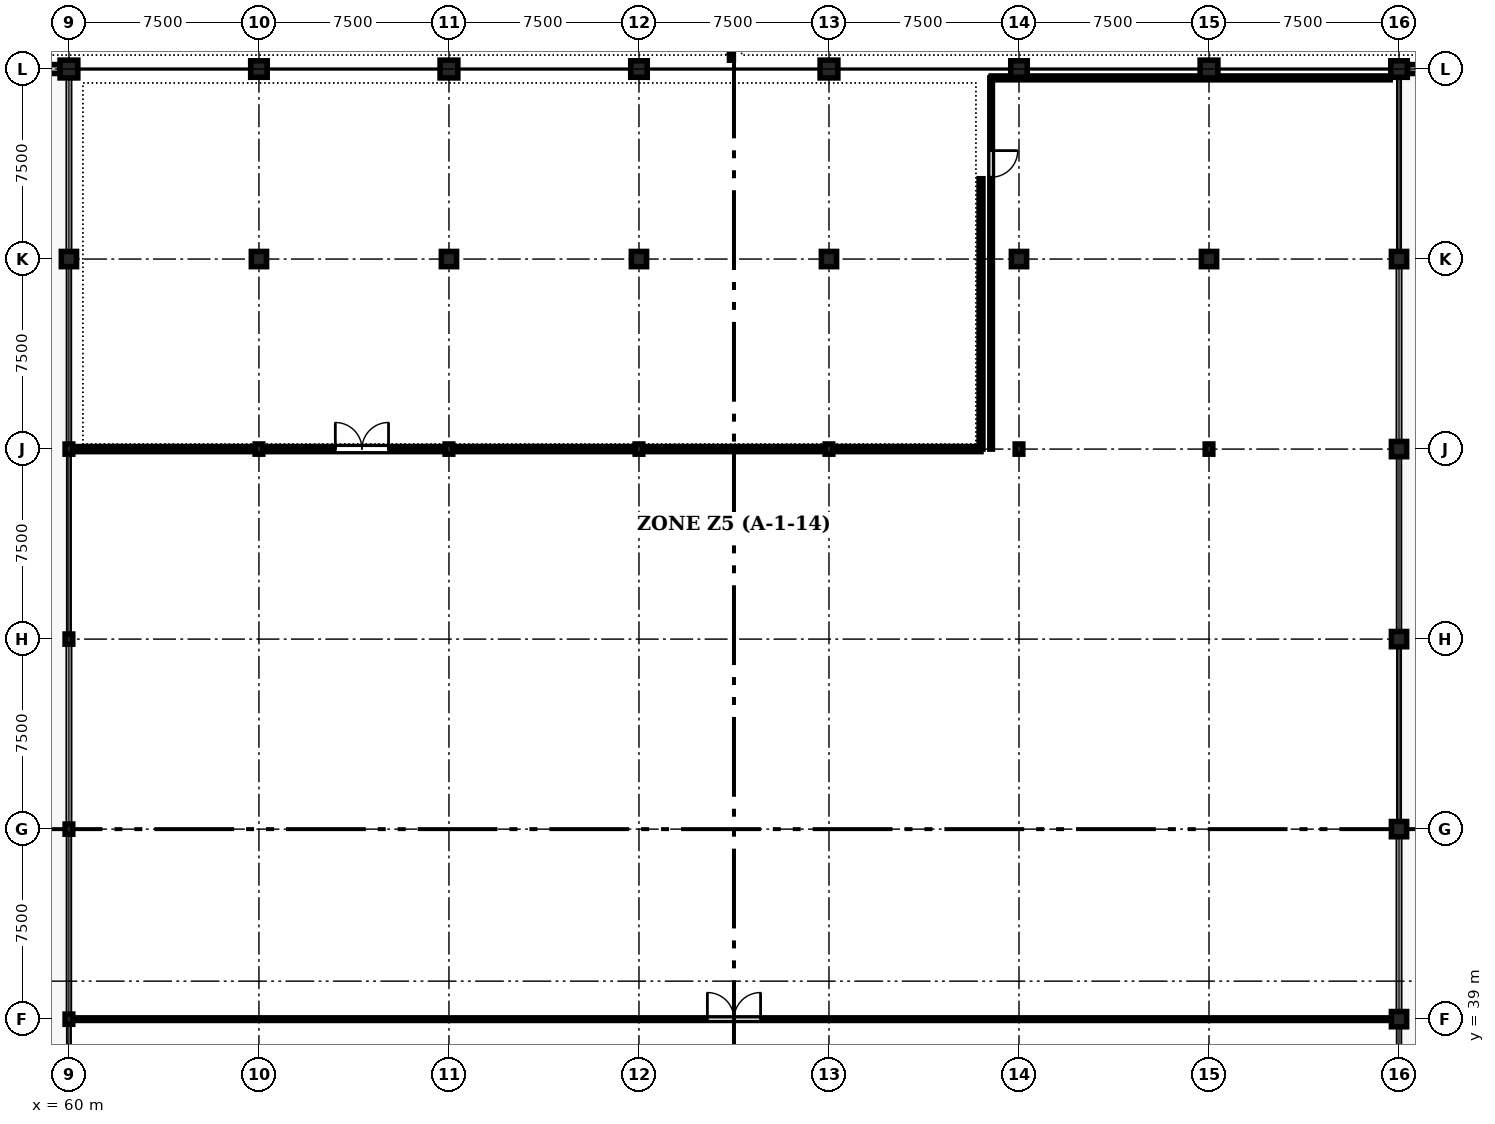
"""IFC4 building model, lengths in metres.
Left out: names, types, materials, properties, quantities, classifications, styles, units other than length and angle.
Written with IfcOpenShell. Run it as: python <this file> out.ifc"""

import sys

from ifc_helpers import new_model, si_unit, direction, frame, frame_2d, origin, origin_2d, place, context, subcontext, project, spatial, rectangle, circle, i_section, extrude, element, fill, save


model = new_model("IFC4")
c1 = context("Model", 3, precision=1e-05, world=origin(), true_north=direction((0.0, 1.0)))
c2 = subcontext(c1, "Body", "Model", "MODEL_VIEW")
j1 = project(units=[si_unit("LENGTHUNIT", "METRE"), si_unit("PLANEANGLEUNIT", "RADIAN")], contexts=[c1])
p1 = place(None, origin())
s1 = spatial("IfcSite", under=j1, at=p1, CompositionType="ELEMENT")
p2 = place(p1, origin())
s2 = spatial("IfcBuilding", under=s1, at=p2, CompositionType="ELEMENT")
p3 = place(p2, origin())
s3 = spatial("IfcBuildingStorey", under=s2, at=p3, CompositionType="ELEMENT", Elevation=0.0)
for number, where, z_axis, x_axis in (
    (1, (60.0, 39.0, 0.0), (0.0, 0.0, 1.0), (1.0, 0.0, 0.0)),
    (2, (60.0, 46.5, 0.0), (0.0, 0.0, 1.0), (1.0, 0.0, 0.0)),
    (3, (60.0, 54.0, 0.0), (0.0, 0.0, 1.0), (1.0, 0.0, 0.0)),
    (4, (60.0, 61.5, 0.0), (0.0, 0.0, 1.0), (1.0, 0.0, 0.0)),
):
    element("IfcColumn", number, at=place(p3, frame(where, z_axis=z_axis, x_axis=x_axis)), inside=s3, PredefinedType="COLUMN", context=c2, shape_type="SweptSolid", body=[
        extrude(i_section(OverallWidth=0.3, OverallDepth=0.4, WebThickness=0.013, FlangeThickness=0.024, FilletRadius=0.027, at=origin_2d()), origin(), (0.0, 0.0, 1.0), 4.8),
    ])
p4 = place(p3, frame((60.0, 69.0, 0.0), z_axis=(0.0, 0.0, 1.0), x_axis=(1.0, 0.0, 0.0)))
e5 = element("IfcColumn", 5, at=p4, inside=s3, PredefinedType="COLUMN", context=c2, shape_type="SweptSolid", body=[
    extrude(rectangle(XDim=0.6, YDim=0.6, at=origin_2d()), origin(), (0.0, 0.0, 1.0), 4.8),
])
p5 = place(p3, frame((60.0, 76.5, 0.0), z_axis=(0.0, 0.0, 1.0), x_axis=(1.0, 0.0, 0.0)))
e6 = element("IfcColumn", 6, at=p5, inside=s3, PredefinedType="COLUMN", context=c2, shape_type="SweptSolid", body=[
    extrude(rectangle(XDim=0.7, YDim=0.7, at=origin_2d()), origin(), (0.0, 0.0, 1.0), 4.8),
])
p6 = place(p3, frame((67.5, 61.5, 0.0), z_axis=(0.0, 0.0, 1.0), x_axis=(1.0, 0.0, 0.0)))
e7 = element("IfcColumn", 7, at=p6, inside=s3, PredefinedType="COLUMN", context=c2, shape_type="SweptSolid", body=[
    extrude(i_section(OverallWidth=0.3, OverallDepth=0.4, WebThickness=0.013, FlangeThickness=0.024, FilletRadius=0.027, at=origin_2d()), origin(), (0.0, 0.0, 1.0), 4.8),
])
p7 = place(p3, frame((67.5, 69.0, 0.0), z_axis=(0.0, 0.0, 1.0), x_axis=(1.0, 0.0, 0.0)))
e8 = element("IfcColumn", 8, at=p7, inside=s3, PredefinedType="COLUMN", context=c2, shape_type="SweptSolid", body=[
    extrude(circle(Radius=0.3, at=origin_2d()), origin(), (0.0, 0.0, 1.0), 4.8),
])
p8 = place(p3, frame((67.5, 76.5, 0.0), z_axis=(0.0, 0.0, 1.0), x_axis=(1.0, 0.0, 0.0)))
e9 = element("IfcColumn", 9, at=p8, inside=s3, PredefinedType="COLUMN", context=c2, shape_type="SweptSolid", body=[
    extrude(rectangle(XDim=0.65, YDim=0.65, at=origin_2d()), origin(), (0.0, 0.0, 1.0), 4.8),
])
p9 = place(p3, frame((75.0, 61.5, 0.0), z_axis=(0.0, 0.0, 1.0), x_axis=(1.0, 0.0, 0.0)))
e10 = element("IfcColumn", 10, at=p9, inside=s3, PredefinedType="COLUMN", context=c2, shape_type="SweptSolid", body=[
    extrude(i_section(OverallWidth=0.3, OverallDepth=0.4, WebThickness=0.013, FlangeThickness=0.024, FilletRadius=0.027, at=origin_2d()), origin(), (0.0, 0.0, 1.0), 4.8),
])
p10 = place(p3, frame((75.0, 69.0, 0.0), z_axis=(0.0, 0.0, 1.0), x_axis=(1.0, 0.0, 0.0)))
e11 = element("IfcColumn", 11, at=p10, inside=s3, PredefinedType="COLUMN", context=c2, shape_type="SweptSolid", body=[
    extrude(rectangle(XDim=0.6, YDim=0.6, at=origin_2d()), origin(), (0.0, 0.0, 1.0), 4.8),
])
p11 = place(p3, frame((75.0, 76.5, 0.0), z_axis=(0.0, 0.0, 1.0), x_axis=(1.0, 0.0, 0.0)))
e12 = element("IfcColumn", 12, at=p11, inside=s3, PredefinedType="COLUMN", context=c2, shape_type="SweptSolid", body=[
    extrude(rectangle(XDim=0.7, YDim=0.7, at=origin_2d()), origin(), (0.0, 0.0, 1.0), 4.8),
])
p12 = place(p3, frame((82.5, 61.5, 0.0), z_axis=(0.0, 0.0, 1.0), x_axis=(1.0, 0.0, 0.0)))
e13 = element("IfcColumn", 13, at=p12, inside=s3, PredefinedType="COLUMN", context=c2, shape_type="SweptSolid", body=[
    extrude(i_section(OverallWidth=0.3, OverallDepth=0.4, WebThickness=0.013, FlangeThickness=0.024, FilletRadius=0.027, at=origin_2d()), origin(), (0.0, 0.0, 1.0), 4.8),
])
p13 = place(p3, frame((82.5, 69.0, 0.0), z_axis=(0.0, 0.0, 1.0), x_axis=(1.0, 0.0, 0.0)))
e14 = element("IfcColumn", 14, at=p13, inside=s3, PredefinedType="COLUMN", context=c2, shape_type="SweptSolid", body=[
    extrude(rectangle(XDim=0.6, YDim=0.6, at=origin_2d()), origin(), (0.0, 0.0, 1.0), 4.8),
])
p14 = place(p3, frame((82.5, 76.5, 0.0), z_axis=(0.0, 0.0, 1.0), x_axis=(1.0, 0.0, 0.0)))
e15 = element("IfcColumn", 15, at=p14, inside=s3, PredefinedType="COLUMN", context=c2, shape_type="SweptSolid", body=[
    extrude(rectangle(XDim=0.65, YDim=0.65, at=origin_2d()), origin(), (0.0, 0.0, 1.0), 4.8),
])
p15 = place(p3, frame((90.0, 61.5, 0.0), z_axis=(0.0, 0.0, 1.0), x_axis=(1.0, 0.0, 0.0)))
e16 = element("IfcColumn", 16, at=p15, inside=s3, PredefinedType="COLUMN", context=c2, shape_type="SweptSolid", body=[
    extrude(i_section(OverallWidth=0.3, OverallDepth=0.4, WebThickness=0.013, FlangeThickness=0.024, FilletRadius=0.027, at=origin_2d()), origin(), (0.0, 0.0, 1.0), 4.8),
])
p16 = place(p3, frame((90.0, 69.0, 0.0), z_axis=(0.0, 0.0, 1.0), x_axis=(1.0, 0.0, 0.0)))
e17 = element("IfcColumn", 17, at=p16, inside=s3, PredefinedType="COLUMN", context=c2, shape_type="SweptSolid", body=[
    extrude(circle(Radius=0.3, at=origin_2d()), origin(), (0.0, 0.0, 1.0), 4.8),
])
p17 = place(p3, frame((90.0, 76.5, 0.0), z_axis=(0.0, 0.0, 1.0), x_axis=(1.0, 0.0, 0.0)))
e18 = element("IfcColumn", 18, at=p17, inside=s3, PredefinedType="COLUMN", context=c2, shape_type="SweptSolid", body=[
    extrude(rectangle(XDim=0.7, YDim=0.7, at=origin_2d()), origin(), (0.0, 0.0, 1.0), 4.8),
])
p18 = place(p3, frame((97.5, 61.5, 0.0), z_axis=(0.0, 0.0, 1.0), x_axis=(1.0, 0.0, 0.0)))
e19 = element("IfcColumn", 19, at=p18, inside=s3, PredefinedType="COLUMN", context=c2, shape_type="SweptSolid", body=[
    extrude(i_section(OverallWidth=0.3, OverallDepth=0.4, WebThickness=0.013, FlangeThickness=0.024, FilletRadius=0.027, at=origin_2d()), origin(), (0.0, 0.0, 1.0), 4.8),
])
p19 = place(p3, frame((97.5, 69.0, 0.0), z_axis=(0.0, 0.0, 1.0), x_axis=(1.0, 0.0, 0.0)))
e20 = element("IfcColumn", 20, at=p19, inside=s3, PredefinedType="COLUMN", context=c2, shape_type="SweptSolid", body=[
    extrude(rectangle(XDim=0.6, YDim=0.6, at=origin_2d()), origin(), (0.0, 0.0, 1.0), 4.8),
])
p20 = place(p3, frame((97.5, 76.5, 0.0), z_axis=(0.0, 0.0, 1.0), x_axis=(1.0, 0.0, 0.0)))
e21 = element("IfcColumn", 21, at=p20, inside=s3, PredefinedType="COLUMN", context=c2, shape_type="SweptSolid", body=[
    extrude(rectangle(XDim=0.65, YDim=0.65, at=origin_2d()), origin(), (0.0, 0.0, 1.0), 4.8),
])
p21 = place(p3, frame((105.0, 61.5, 0.0), z_axis=(0.0, 0.0, 1.0), x_axis=(1.0, 0.0, 0.0)))
e22 = element("IfcColumn", 22, at=p21, inside=s3, PredefinedType="COLUMN", context=c2, shape_type="SweptSolid", body=[
    extrude(i_section(OverallWidth=0.3, OverallDepth=0.4, WebThickness=0.013, FlangeThickness=0.024, FilletRadius=0.027, at=origin_2d()), origin(), (0.0, 0.0, 1.0), 4.8),
])
p22 = place(p3, frame((105.0, 69.0, 0.0), z_axis=(0.0, 0.0, 1.0), x_axis=(1.0, 0.0, 0.0)))
e23 = element("IfcColumn", 23, at=p22, inside=s3, PredefinedType="COLUMN", context=c2, shape_type="SweptSolid", body=[
    extrude(rectangle(XDim=0.6, YDim=0.6, at=origin_2d()), origin(), (0.0, 0.0, 1.0), 4.8),
])
p23 = place(p3, frame((105.0, 76.5, 0.0), z_axis=(0.0, 0.0, 1.0), x_axis=(1.0, 0.0, 0.0)))
e24 = element("IfcColumn", 24, at=p23, inside=s3, PredefinedType="COLUMN", context=c2, shape_type="SweptSolid", body=[
    extrude(rectangle(XDim=0.7, YDim=0.7, at=origin_2d()), origin(), (0.0, 0.0, 1.0), 4.8),
])
p24 = place(p3, frame((112.5, 39.0, 0.0), z_axis=(0.0, 0.0, 1.0), x_axis=(1.0, 0.0, 0.0)))
e25 = element("IfcColumn", 25, at=p24, inside=s3, PredefinedType="COLUMN", context=c2, shape_type="SweptSolid", body=[
    extrude(rectangle(XDim=0.6, YDim=0.6, at=origin_2d()), origin(), (0.0, 0.0, 1.0), 4.8),
])
p25 = place(p3, frame((112.5, 46.5, 0.0), z_axis=(0.0, 0.0, 1.0), x_axis=(1.0, 0.0, 0.0)))
e26 = element("IfcColumn", 26, at=p25, inside=s3, PredefinedType="COLUMN", context=c2, shape_type="SweptSolid", body=[
    extrude(circle(Radius=0.3, at=origin_2d()), origin(), (0.0, 0.0, 1.0), 4.8),
])
for number, where, z_axis, x_axis in (
    (27, (112.5, 54.0, 0.0), (0.0, 0.0, 1.0), (1.0, 0.0, 0.0)),
    (28, (112.5, 61.5, 0.0), (0.0, 0.0, 1.0), (1.0, 0.0, 0.0)),
):
    element("IfcColumn", number, at=place(p3, frame(where, z_axis=z_axis, x_axis=x_axis)), inside=s3, PredefinedType="COLUMN", context=c2, shape_type="SweptSolid", body=[
        extrude(rectangle(XDim=0.6, YDim=0.6, at=origin_2d()), origin(), (0.0, 0.0, 1.0), 4.8),
    ])
p26 = place(p3, frame((112.5, 69.0, 0.0), z_axis=(0.0, 0.0, 1.0), x_axis=(1.0, 0.0, 0.0)))
e29 = element("IfcColumn", 29, at=p26, inside=s3, PredefinedType="COLUMN", context=c2, shape_type="SweptSolid", body=[
    extrude(circle(Radius=0.3, at=origin_2d()), origin(), (0.0, 0.0, 1.0), 4.8),
])
p27 = place(p3, frame((112.5, 76.5, 0.0), z_axis=(0.0, 0.0, 1.0), x_axis=(1.0, 0.0, 0.0)))
e30 = element("IfcColumn", 30, at=p27, inside=s3, PredefinedType="COLUMN", context=c2, shape_type="SweptSolid", body=[
    extrude(rectangle(XDim=0.65, YDim=0.65, at=origin_2d()), origin(), (0.0, 0.0, 1.0), 4.8),
])
p28 = place(p3, frame((59.64, 76.5, 0.0), z_axis=(0.0, 0.0, 1.0), x_axis=(-1.0, 0.0, 0.0)))
e31 = element("IfcWall", 31, at=p28, inside=s3, PredefinedType="STANDARD", context=c2, shape_type="SweptSolid", body=[
    extrude(rectangle(XDim=6.805, YDim=0.35, at=frame_2d((3.402, 0.0))), origin(), (0.0, 0.0, 1.0), 3.95),
])
p29 = place(p28, frame((2.653, 0.0, 0.9)))
e32 = element("IfcOpeningElement", 32, at=p29, cuts=e31, PredefinedType="OPENING", context=c2, shape_type="SweptSolid", body=[
    extrude(rectangle(XDim=1.5, YDim=2.4, at=frame_2d((0.75, 1.2))), frame((0.0, 0.185, 0.0), z_axis=(0.0, -1.0, 0.0), x_axis=(1.0, 0.0, 0.0)), (0.0, 0.0, 1.0), 0.37),
])
p30 = place(p3, frame((119.64, 76.5, 0.0), z_axis=(0.0, 0.0, 1.0), x_axis=(-1.0, 0.0, 0.0)))
e33 = element("IfcWall", 33, at=p30, inside=s3, PredefinedType="STANDARD", context=c2, shape_type="SweptSolid", body=[
    extrude(rectangle(XDim=6.805, YDim=0.35, at=frame_2d((3.402, 0.0))), origin(), (0.0, 0.0, 1.0), 3.95),
])
p31 = place(p30, frame((2.603, 0.0, 0.9)))
e34 = element("IfcOpeningElement", 34, at=p31, cuts=e33, PredefinedType="OPENING", context=c2, shape_type="SweptSolid", body=[
    extrude(rectangle(XDim=1.6, YDim=1.95, at=frame_2d((0.8, 0.975))), frame((0.0, 0.185, 0.0), z_axis=(0.0, -1.0, 0.0), x_axis=(1.0, 0.0, 0.0)), (0.0, 0.0, 1.0), 0.37),
])
p32 = place(p3, frame((60.35, 39.0, 0.0), z_axis=(0.0, 0.0, 1.0), x_axis=(1.0, 0.0, 0.0)))
e35 = element("IfcWall", 35, at=p32, inside=s3, PredefinedType="PARTITIONING", context=c2, shape_type="SweptSolid", body=[
    extrude(rectangle(XDim=51.8, YDim=0.1, at=frame_2d((25.9, 0.0))), origin(), (0.0, 0.0, 1.0), 4.485),
])
p33 = place(p32, frame((24.85, 0.0, 0.0)))
e36 = element("IfcOpeningElement", 36, at=p33, cuts=e35, PredefinedType="OPENING", context=c2, shape_type="SweptSolid", body=[
    extrude(rectangle(XDim=2.1, YDim=2.4, at=frame_2d((1.05, 1.2))), frame((0.0, 0.06, 0.0), z_axis=(0.0, -1.0, 0.0), x_axis=(1.0, 0.0, 0.0)), (0.0, 0.0, 1.0), 0.12),
])
p34 = place(p3, frame((60.35, 61.5, 0.0), z_axis=(0.0, 0.0, 1.0), x_axis=(1.0, 0.0, 0.0)))
e37 = element("IfcWall", 37, at=p34, inside=s3, PredefinedType="STANDARD", context=c2, shape_type="SweptSolid", body=[
    extrude(rectangle(XDim=35.65, YDim=0.2, at=frame_2d((17.825, 0.0))), origin(), (0.0, 0.0, 1.0), 3.835),
])
p35 = place(p34, frame((10.165, 0.0, 0.0)))
e38 = element("IfcOpeningElement", 38, at=p35, cuts=e37, PredefinedType="OPENING", context=c2, shape_type="SweptSolid", body=[
    extrude(rectangle(XDim=2.1, YDim=2.4, at=frame_2d((1.05, 1.2))), frame((0.0, 0.11, 0.0), z_axis=(0.0, -1.0, 0.0), x_axis=(1.0, 0.0, 0.0)), (0.0, 0.0, 1.0), 0.22),
])
p36 = place(p3, frame((96.4, 76.15, 0.0), z_axis=(0.0, 0.0, 1.0), x_axis=(0.0, -1.0, 0.0)))
e39 = element("IfcWall", 39, at=p36, inside=s3, PredefinedType="PARTITIONING", context=c2, shape_type="SweptSolid", body=[
    extrude(rectangle(XDim=14.65, YDim=0.1, at=frame_2d((7.325, 0.0))), origin(), (0.0, 0.0, 1.0), 4.485),
])
p37 = place(p36, frame((2.87, 0.0, 0.0)))
e40 = element("IfcOpeningElement", 40, at=p37, cuts=e39, PredefinedType="OPENING", context=c2, shape_type="SweptSolid", body=[
    extrude(rectangle(XDim=1.05, YDim=2.2, at=frame_2d((0.525, 1.1))), frame((0.0, 0.06, 0.0), z_axis=(0.0, -1.0, 0.0), x_axis=(1.0, 0.0, 0.0)), (0.0, 0.0, 1.0), 0.12),
])
p38 = place(p3, frame((96.0, 61.5, 0.0), z_axis=(0.0, 0.0, 1.0), x_axis=(0.0, 1.0, 0.0)))
e41 = element("IfcWall", 41, at=p38, inside=s3, PredefinedType="PARTITIONING", context=c2, shape_type="SweptSolid", body=[
    extrude(rectangle(XDim=10.67, YDim=0.15, at=frame_2d((5.335, 0.0))), origin(), (0.0, 0.0, 1.0), 4.485),
])
p39 = place(p3, frame((96.4, 76.15, 0.0), z_axis=(0.0, 0.0, 1.0), x_axis=(1.0, 0.0, 0.0)))
e42 = element("IfcWall", 42, at=p39, inside=s3, PredefinedType="PARTITIONING", context=c2, shape_type="SweptSolid", body=[
    extrude(rectangle(XDim=15.75, YDim=0.15, at=frame_2d((7.875, 0.0))), origin(), (0.0, 0.0, 1.0), 3.835),
])
p40 = place(p3, frame((86.15, 76.85, 0.0), z_axis=(0.0, 0.0, 1.0), x_axis=(0.0, 1.0, 0.0)))
e43 = element("IfcWall", 43, at=p40, inside=s3, PredefinedType="PARTITIONING", context=c2, shape_type="SweptSolid", body=[
    extrude(rectangle(XDim=28.7, YDim=0.15, at=frame_2d((14.35, 0.0))), origin(), (0.0, 0.0, 1.0), 4.085),
])
p41 = place(p33, origin())
e44 = element("IfcDoor", 44, at=p41, inside=s3, OperationType="DOUBLE_DOOR_SINGLE_SWING", PredefinedType="DOOR", context=c2, shape_type="SweptSolid", body=[
    extrude(rectangle(XDim=2.1, YDim=2.4, at=frame_2d((1.05, 1.2))), frame((0.0, 0.025, 0.0), z_axis=(0.0, -1.0, 0.0), x_axis=(1.0, 0.0, 0.0)), (0.0, 0.0, 1.0), 0.05),
])
fill(e36, e44)
p42 = place(p35, origin())
e45 = element("IfcDoor", 45, at=p42, inside=s3, OperationType="DOUBLE_DOOR_SINGLE_SWING", PredefinedType="DOOR", context=c2, shape_type="SweptSolid", body=[
    extrude(rectangle(XDim=2.1, YDim=2.4, at=frame_2d((1.05, 1.2))), frame((0.0, 0.025, 0.0), z_axis=(0.0, -1.0, 0.0), x_axis=(1.0, 0.0, 0.0)), (0.0, 0.0, 1.0), 0.05),
])
fill(e38, e45)
p43 = place(p37, origin())
e46 = element("IfcDoor", 46, at=p43, inside=s3, OperationType="SINGLE_SWING_LEFT", PredefinedType="DOOR", context=c2, shape_type="SweptSolid", body=[
    extrude(rectangle(XDim=1.05, YDim=2.2, at=frame_2d((0.525, 1.1))), frame((0.0, 0.025, 0.0), z_axis=(0.0, -1.0, 0.0), x_axis=(1.0, 0.0, 0.0)), (0.0, 0.0, 1.0), 0.05),
])
fill(e40, e46)
save(model, sys.argv[1])
